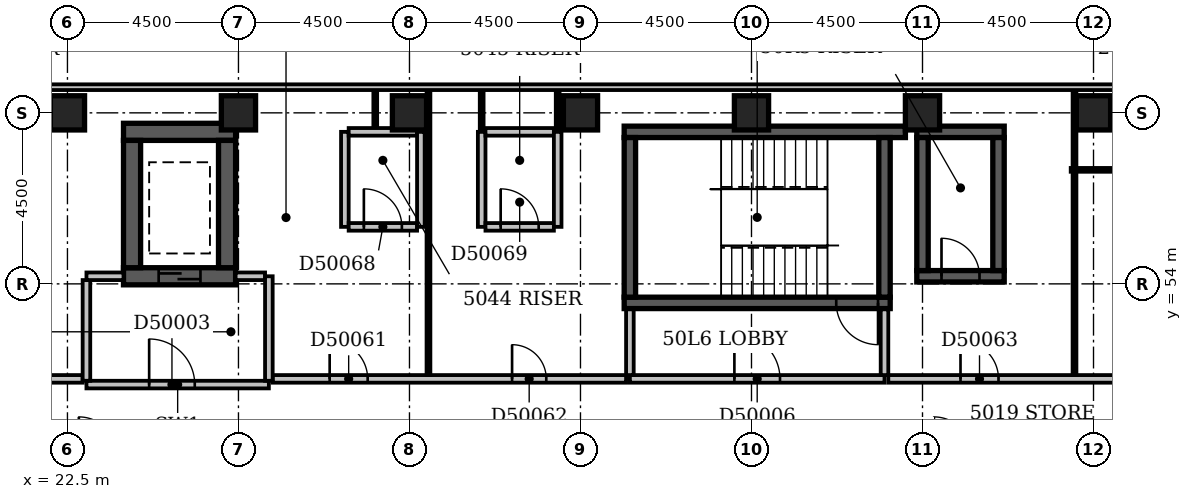
"""IFC4 building model, lengths in metres.
Left out: names, types, materials, properties, quantities, classifications, styles, units other than length and angle.
Written with IfcOpenShell. Run it as: python <this file> out.ifc"""

import sys

from ifc_helpers import new_model, si_unit, direction, frame, frame_2d, origin, origin_2d, place, context, subcontext, project, spatial, rectangle, extrude, element, fill, save


model = new_model("IFC4")
c1 = context("Model", 3, precision=1e-05, world=origin(), true_north=direction((0.0, 1.0)))
c2 = subcontext(c1, "Body", "Model", "MODEL_VIEW")
j1 = project(units=[si_unit("LENGTHUNIT", "METRE"), si_unit("PLANEANGLEUNIT", "RADIAN")], contexts=[c1])
p1 = place(None, origin())
s1 = spatial("IfcSite", under=j1, at=p1, CompositionType="ELEMENT")
p2 = place(p1, origin())
s2 = spatial("IfcBuilding", under=s1, at=p2, CompositionType="ELEMENT")
p3 = place(p2, frame((0.0, 0.0, 197.0)))
s3 = spatial("IfcBuildingStorey", under=s2, at=p3, CompositionType="ELEMENT", Elevation=197.0)
p4 = place(p3, frame((23.975, 54.2, -0.3), z_axis=(0.0, 0.0, 1.0), x_axis=(1.0, 0.0, 0.0)))
e1 = element("IfcWall", 1, at=p4, inside=s3, PredefinedType="SHEAR", context=c2, shape_type="SweptSolid", body=[
    extrude(rectangle(XDim=2.95, YDim=0.45, at=frame_2d((1.475, 0.0))), origin(), (0.0, 0.0, 1.0), 3.6),
])
p5 = place(p4, frame((0.925, 0.0, 0.3)))
e2 = element("IfcOpeningElement", 2, at=p5, cuts=e1, PredefinedType="OPENING", context=c2, shape_type="SweptSolid", body=[
    extrude(rectangle(XDim=1.1, YDim=2.1, at=frame_2d((0.55, 1.05))), frame((0.0, 0.237, 0.0), z_axis=(0.0, -1.0, 0.0), x_axis=(1.0, 0.0, 0.0)), (0.0, 0.0, 1.0), 0.474),
])
p6 = place(p3, frame((23.975, 58.0, -0.3), z_axis=(0.0, 0.0, 1.0), x_axis=(1.0, 0.0, 0.0)))
e3 = element("IfcWall", 3, at=p6, inside=s3, PredefinedType="SHEAR", context=c2, shape_type="SweptSolid", body=[
    extrude(rectangle(XDim=2.95, YDim=0.45, at=frame_2d((1.475, 0.0))), origin(), (0.0, 0.0, 1.0), 3.6),
])
for number, where, z_axis, x_axis in (
    (4, (24.2, 54.425, -0.3), (0.0, 0.0, 1.0), (0.0, 1.0, 0.0)),
    (5, (26.7, 54.425, -0.3), (0.0, 0.0, 1.0), (0.0, 1.0, 0.0)),
):
    element("IfcWall", number, at=place(p3, frame(where, z_axis=z_axis, x_axis=x_axis)), inside=s3, PredefinedType="SHEAR", context=c2, shape_type="SweptSolid", body=[
        extrude(rectangle(XDim=3.35, YDim=0.45, at=frame_2d((1.675, 0.0))), origin(), (0.0, 0.0, 1.0), 3.6),
    ])
p7 = place(p3, frame((37.15, 53.5, -0.3), z_axis=(0.0, 0.0, 1.0), x_axis=(1.0, 0.0, 0.0)))
e6 = element("IfcWall", 6, at=p7, inside=s3, PredefinedType="SHEAR", context=c2, shape_type="SweptSolid", body=[
    extrude(rectangle(XDim=7.0, YDim=0.3, at=frame_2d((3.5, 0.0))), origin(), (0.0, 0.0, 1.0), 3.6),
])
p8 = place(p7, frame((5.58, 0.0, 0.3)))
e7 = element("IfcOpeningElement", 7, at=p8, cuts=e6, PredefinedType="OPENING", context=c2, shape_type="SweptSolid", body=[
    extrude(rectangle(XDim=1.1, YDim=2.1, at=frame_2d((0.55, 1.05))), frame((0.0, 0.162, 0.0), z_axis=(0.0, -1.0, 0.0), x_axis=(1.0, 0.0, 0.0)), (0.0, 0.0, 1.0), 0.324),
])
p9 = place(p3, frame((37.15, 58.0, -0.3), z_axis=(0.0, 0.0, 1.0), x_axis=(1.0, 0.0, 0.0)))
e8 = element("IfcWall", 8, at=p9, inside=s3, PredefinedType="SHEAR", context=c2, shape_type="SweptSolid", body=[
    extrude(rectangle(XDim=7.4, YDim=0.3, at=frame_2d((3.7, 0.0))), origin(), (0.0, 0.0, 1.0), 3.6),
])
for number, where, z_axis, x_axis in (
    (9, (37.3, 53.65, -0.3), (0.0, 0.0, 1.0), (0.0, 1.0, 0.0)),
    (10, (44.0, 53.65, -0.3), (0.0, 0.0, 1.0), (0.0, 1.0, 0.0)),
):
    element("IfcWall", number, at=place(p3, frame(where, z_axis=z_axis, x_axis=x_axis)), inside=s3, PredefinedType="SHEAR", context=c2, shape_type="SweptSolid", body=[
        extrude(rectangle(XDim=4.2, YDim=0.3, at=frame_2d((2.1, 0.0))), origin(), (0.0, 0.0, 1.0), 3.6),
    ])
p10 = place(p3, frame((44.85, 54.2, -0.3), z_axis=(0.0, 0.0, 1.0), x_axis=(1.0, 0.0, 0.0)))
e11 = element("IfcWall", 11, at=p10, inside=s3, PredefinedType="SHEAR", context=c2, shape_type="SweptSolid", body=[
    extrude(rectangle(XDim=2.3, YDim=0.3, at=frame_2d((1.15, 0.0))), origin(), (0.0, 0.0, 1.0), 3.6),
])
p11 = place(p10, frame((0.65, 0.0, 0.3)))
e12 = element("IfcOpeningElement", 12, at=p11, cuts=e11, PredefinedType="OPENING", context=c2, shape_type="SweptSolid", body=[
    extrude(rectangle(XDim=1.0, YDim=2.1, at=frame_2d((0.5, 1.05))), frame((0.0, 0.162, 0.0), z_axis=(0.0, -1.0, 0.0), x_axis=(1.0, 0.0, 0.0)), (0.0, 0.0, 1.0), 0.324),
])
p12 = place(p3, frame((44.85, 58.0, -0.3), z_axis=(0.0, 0.0, 1.0), x_axis=(1.0, 0.0, 0.0)))
e13 = element("IfcWall", 13, at=p12, inside=s3, PredefinedType="SHEAR", context=c2, shape_type="SweptSolid", body=[
    extrude(rectangle(XDim=2.3, YDim=0.3, at=frame_2d((1.15, 0.0))), origin(), (0.0, 0.0, 1.0), 3.6),
])
for number, where, z_axis, x_axis in (
    (14, (45.0, 54.35, -0.3), (0.0, 0.0, 1.0), (0.0, 1.0, 0.0)),
    (15, (47.0, 54.35, -0.3), (0.0, 0.0, 1.0), (0.0, 1.0, 0.0)),
):
    element("IfcWall", number, at=place(p3, frame(where, z_axis=z_axis, x_axis=x_axis)), inside=s3, PredefinedType="SHEAR", context=c2, shape_type="SweptSolid", body=[
        extrude(rectangle(XDim=3.5, YDim=0.3, at=frame_2d((1.75, 0.0))), origin(), (0.0, 0.0, 1.0), 3.6),
    ])
for number, where, z_axis, x_axis in (
    (16, (22.5, 58.5, -0.3), (0.0, 0.0, 1.0), (1.0, 0.0, 0.0)),
    (17, (27.0, 58.5, -0.3), (0.0, 0.0, 1.0), (1.0, 0.0, 0.0)),
    (18, (31.5, 58.5, -0.3), (0.0, 0.0, 1.0), (1.0, 0.0, 0.0)),
    (19, (36.0, 58.5, -0.3), (0.0, 0.0, 1.0), (1.0, 0.0, 0.0)),
    (20, (40.5, 58.5, -0.3), (0.0, 0.0, 1.0), (1.0, 0.0, 0.0)),
    (21, (45.0, 58.5, -0.3), (0.0, 0.0, 1.0), (1.0, 0.0, 0.0)),
    (22, (49.5, 58.5, -0.3), (0.0, 0.0, 1.0), (1.0, 0.0, 0.0)),
):
    element("IfcColumn", number, at=place(p3, frame(where, z_axis=z_axis, x_axis=x_axis)), inside=s3, PredefinedType="COLUMN", context=c2, shape_type="SweptSolid", body=[
        extrude(rectangle(XDim=0.9, YDim=0.9, at=origin_2d()), origin(), (0.0, 0.0, 1.0), 3.6),
    ])
p13 = place(p3, frame((50.1, 59.175, 0.0), z_axis=(0.0, 0.0, 1.0), x_axis=(-1.0, 0.0, 0.0)))
e23 = element("IfcWall", 23, at=p13, inside=s3, PredefinedType="STANDARD", context=c2, shape_type="SweptSolid", body=[
    extrude(rectangle(XDim=50.85, YDim=0.15, at=frame_2d((25.425, 0.0))), origin(), (0.0, 0.0, 1.0), 2.7),
])
p14 = place(p3, frame((23.0, 51.35, 0.0), z_axis=(0.0, 0.0, 1.0), x_axis=(1.0, 0.0, 0.0)))
e24 = element("IfcWall", 24, at=p14, inside=s3, PredefinedType="PARTITIONING", context=c2, shape_type="SweptSolid", body=[
    extrude(rectangle(XDim=4.8, YDim=0.2, at=frame_2d((2.4, 0.0))), origin(), (0.0, 0.0, 1.0), 3.3),
])
p15 = place(p14, frame((1.65, 0.0, 0.0)))
e25 = element("IfcOpeningElement", 25, at=p15, cuts=e24, PredefinedType="OPENING", context=c2, shape_type="SweptSolid", body=[
    extrude(rectangle(XDim=1.2, YDim=2.1, at=frame_2d((0.6, 1.05))), frame((0.0, 0.112, 0.0), z_axis=(0.0, -1.0, 0.0), x_axis=(1.0, 0.0, 0.0)), (0.0, 0.0, 1.0), 0.224),
])
p16 = place(p3, frame((27.8, 51.45, 0.0), z_axis=(0.0, 0.0, 1.0), x_axis=(0.0, 1.0, 0.0)))
e26 = element("IfcWall", 26, at=p16, inside=s3, PredefinedType="PARTITIONING", context=c2, shape_type="SweptSolid", body=[
    extrude(rectangle(XDim=2.75, YDim=0.2, at=frame_2d((1.375, 0.0))), origin(), (0.0, 0.0, 1.0), 3.3),
])
p17 = place(p3, frame((23.0, 54.2, 0.0), z_axis=(0.0, 0.0, 1.0), x_axis=(1.0, 0.0, 0.0)))
e27 = element("IfcWall", 27, at=p17, inside=s3, PredefinedType="PARTITIONING", context=c2, shape_type="SweptSolid", body=[
    extrude(rectangle(XDim=0.975, YDim=0.2, at=frame_2d((0.488, 0.0))), origin(), (0.0, 0.0, 1.0), 3.3),
])
p18 = place(p3, frame((26.925, 54.2, 0.0), z_axis=(0.0, 0.0, 1.0), x_axis=(1.0, 0.0, 0.0)))
e28 = element("IfcWall", 28, at=p18, inside=s3, PredefinedType="PARTITIONING", context=c2, shape_type="SweptSolid", body=[
    extrude(rectangle(XDim=0.775, YDim=0.2, at=frame_2d((0.387, 0.0))), origin(), (0.0, 0.0, 1.0), 3.3),
])
p19 = place(p3, frame((23.0, 51.45, 0.0), z_axis=(0.0, 0.0, 1.0), x_axis=(0.0, 1.0, 0.0)))
e29 = element("IfcWall", 29, at=p19, inside=s3, PredefinedType="PARTITIONING", context=c2, shape_type="SweptSolid", body=[
    extrude(rectangle(XDim=2.65, YDim=0.2, at=frame_2d((1.325, 0.0))), origin(), (0.0, 0.0, 1.0), 3.3),
])
p20 = place(p3, frame((37.3, 51.5, 0.0), z_axis=(0.0, 0.0, 1.0), x_axis=(1.0, 0.0, 0.0)))
e30 = element("IfcWall", 30, at=p20, inside=s3, PredefinedType="PARTITIONING", context=c2, shape_type="SweptSolid", body=[
    extrude(rectangle(XDim=6.7, YDim=0.2, at=frame_2d((3.35, 0.0))), origin(), (0.0, 0.0, 1.0), 3.3),
])
p21 = place(p20, frame((2.75, 0.0, 0.0)))
e31 = element("IfcOpeningElement", 31, at=p21, cuts=e30, PredefinedType="OPENING", context=c2, shape_type="SweptSolid", body=[
    extrude(rectangle(XDim=1.2, YDim=2.1, at=frame_2d((0.6, 1.05))), frame((0.0, 0.112, 0.0), z_axis=(0.0, -1.0, 0.0), x_axis=(1.0, 0.0, 0.0)), (0.0, 0.0, 1.0), 0.224),
])
for number, where, z_axis, x_axis in (
    (32, (44.0, 51.6, 0.0), (0.0, 0.0, 1.0), (0.0, 1.0, 0.0)),
    (33, (37.3, 51.6, 0.0), (0.0, 0.0, 1.0), (0.0, 1.0, 0.0)),
):
    element("IfcWall", number, at=place(p3, frame(where, z_axis=z_axis, x_axis=x_axis)), inside=s3, PredefinedType="PARTITIONING", context=c2, shape_type="SweptSolid", body=[
        extrude(rectangle(XDim=1.73, YDim=0.2, at=frame_2d((0.865, 0.0))), origin(), (0.0, 0.0, 1.0), 3.3),
    ])
p22 = place(p3, frame((7.6, 51.5, 0.0), z_axis=(0.0, 0.0, 1.0), x_axis=(1.0, 0.0, 0.0)))
e34 = element("IfcWall", 34, at=p22, inside=s3, PredefinedType="PARTITIONING", context=c2, shape_type="SweptSolid", body=[
    extrude(rectangle(XDim=15.3, YDim=0.2, at=frame_2d((7.65, 0.0))), origin(), (0.0, 0.0, 1.0), 3.3),
])
p23 = place(p22, frame((3.55, 0.0, 0.0)))
e35 = element("IfcOpeningElement", 35, at=p23, cuts=e34, PredefinedType="OPENING", context=c2, shape_type="SweptSolid", body=[
    extrude(rectangle(XDim=0.9, YDim=2.1, at=frame_2d((0.45, 1.05))), frame((0.0, 0.112, 0.0), z_axis=(0.0, -1.0, 0.0), x_axis=(1.0, 0.0, 0.0)), (0.0, 0.0, 1.0), 0.224),
])
p24 = place(p22, frame((11.3, 0.0, 0.0)))
e36 = element("IfcOpeningElement", 36, at=p24, cuts=e34, PredefinedType="OPENING", context=c2, shape_type="SweptSolid", body=[
    extrude(rectangle(XDim=0.9, YDim=2.1, at=frame_2d((0.45, 1.05))), frame((0.0, 0.112, 0.0), z_axis=(0.0, -1.0, 0.0), x_axis=(1.0, 0.0, 0.0)), (0.0, 0.0, 1.0), 0.224),
])
p25 = place(p3, frame((27.9, 51.5, 0.0), z_axis=(0.0, 0.0, 1.0), x_axis=(1.0, 0.0, 0.0)))
e37 = element("IfcWall", 37, at=p25, inside=s3, PredefinedType="PARTITIONING", context=c2, shape_type="SweptSolid", body=[
    extrude(rectangle(XDim=9.3, YDim=0.2, at=frame_2d((4.65, 0.0))), origin(), (0.0, 0.0, 1.0), 3.3),
])
p26 = place(p25, frame((1.5, 0.0, 0.0)))
e38 = element("IfcOpeningElement", 38, at=p26, cuts=e37, PredefinedType="OPENING", context=c2, shape_type="SweptSolid", body=[
    extrude(rectangle(XDim=1.0, YDim=2.1, at=frame_2d((0.5, 1.05))), frame((0.0, 0.112, 0.0), z_axis=(0.0, -1.0, 0.0), x_axis=(1.0, 0.0, 0.0)), (0.0, 0.0, 1.0), 0.224),
])
p27 = place(p25, frame((6.3, 0.0, 0.0)))
e39 = element("IfcOpeningElement", 39, at=p27, cuts=e37, PredefinedType="OPENING", context=c2, shape_type="SweptSolid", body=[
    extrude(rectangle(XDim=0.9, YDim=2.1, at=frame_2d((0.45, 1.05))), frame((0.0, 0.112, 0.0), z_axis=(0.0, -1.0, 0.0), x_axis=(1.0, 0.0, 0.0)), (0.0, 0.0, 1.0), 0.224),
])
p28 = place(p3, frame((44.1, 51.5, 0.0), z_axis=(0.0, 0.0, 1.0), x_axis=(1.0, 0.0, 0.0)))
e40 = element("IfcWall", 40, at=p28, inside=s3, PredefinedType="PARTITIONING", context=c2, shape_type="SweptSolid", body=[
    extrude(rectangle(XDim=10.5, YDim=0.2, at=frame_2d((5.25, 0.0))), origin(), (0.0, 0.0, 1.0), 3.3),
])
p29 = place(p28, frame((1.9, 0.0, 0.0)))
e41 = element("IfcOpeningElement", 41, at=p29, cuts=e40, PredefinedType="OPENING", context=c2, shape_type="SweptSolid", body=[
    extrude(rectangle(XDim=1.0, YDim=2.1, at=frame_2d((0.5, 1.05))), frame((0.0, 0.112, 0.0), z_axis=(0.0, -1.0, 0.0), x_axis=(1.0, 0.0, 0.0)), (0.0, 0.0, 1.0), 0.224),
])
p30 = place(p28, frame((6.9, 0.0, 0.0)))
e42 = element("IfcOpeningElement", 42, at=p30, cuts=e40, PredefinedType="OPENING", context=c2, shape_type="SweptSolid", body=[
    extrude(rectangle(XDim=1.0, YDim=2.1, at=frame_2d((0.5, 1.05))), frame((0.0, 0.112, 0.0), z_axis=(0.0, -1.0, 0.0), x_axis=(1.0, 0.0, 0.0)), (0.0, 0.0, 1.0), 0.224),
])
for number, where, z_axis, x_axis in (
    (43, (32.0, 51.6, 0.0), (0.0, 0.0, 1.0), (0.0, 1.0, 0.0)),
    (44, (49.0, 51.6, 0.0), (0.0, 0.0, 1.0), (0.0, 1.0, 0.0)),
):
    element("IfcWall", number, at=place(p3, frame(where, z_axis=z_axis, x_axis=x_axis)), inside=s3, PredefinedType="PARTITIONING", context=c2, shape_type="SweptSolid", body=[
        extrude(rectangle(XDim=7.5, YDim=0.1, at=frame_2d((3.75, 0.0))), origin(), (0.0, 0.0, 1.0), 3.3),
    ])
p31 = place(p3, frame((29.8, 55.5, 0.0), z_axis=(0.0, 0.0, 1.0), x_axis=(0.0, 1.0, 0.0)))
e45 = element("IfcWall", 45, at=p31, inside=s3, PredefinedType="PARTITIONING", context=c2, shape_type="SweptSolid", body=[
    extrude(rectangle(XDim=2.5, YDim=0.2, at=frame_2d((1.25, 0.0))), origin(), (0.0, 0.0, 1.0), 3.3),
])
p32 = place(p3, frame((29.9, 55.5, 0.0), z_axis=(0.0, 0.0, 1.0), x_axis=(1.0, 0.0, 0.0)))
e46 = element("IfcWall", 46, at=p32, inside=s3, PredefinedType="PARTITIONING", context=c2, shape_type="SweptSolid", body=[
    extrude(rectangle(XDim=1.8, YDim=0.2, at=frame_2d((0.9, 0.0))), origin(), (0.0, 0.0, 1.0), 3.3),
])
p33 = place(p32, frame((0.4, 0.0, 0.0)))
e47 = element("IfcOpeningElement", 47, at=p33, cuts=e46, PredefinedType="OPENING", context=c2, shape_type="SweptSolid", body=[
    extrude(rectangle(XDim=1.0, YDim=2.1, at=frame_2d((0.5, 1.05))), frame((0.0, 0.112, 0.0), z_axis=(0.0, -1.0, 0.0), x_axis=(1.0, 0.0, 0.0)), (0.0, 0.0, 1.0), 0.224),
])
for number, where, z_axis, x_axis in (
    (48, (31.8, 55.5, 0.0), (0.0, 0.0, 1.0), (0.0, 1.0, 0.0)),
    (49, (33.4, 55.5, 0.0), (0.0, 0.0, 1.0), (0.0, 1.0, 0.0)),
):
    element("IfcWall", number, at=place(p3, frame(where, z_axis=z_axis, x_axis=x_axis)), inside=s3, PredefinedType="PARTITIONING", context=c2, shape_type="SweptSolid", body=[
        extrude(rectangle(XDim=2.5, YDim=0.2, at=frame_2d((1.25, 0.0))), origin(), (0.0, 0.0, 1.0), 3.3),
    ])
p34 = place(p3, frame((33.5, 55.5, 0.0), z_axis=(0.0, 0.0, 1.0), x_axis=(1.0, 0.0, 0.0)))
e50 = element("IfcWall", 50, at=p34, inside=s3, PredefinedType="PARTITIONING", context=c2, shape_type="SweptSolid", body=[
    extrude(rectangle(XDim=1.8, YDim=0.2, at=frame_2d((0.9, 0.0))), origin(), (0.0, 0.0, 1.0), 3.3),
])
p35 = place(p34, frame((0.4, 0.0, 0.0)))
e51 = element("IfcOpeningElement", 51, at=p35, cuts=e50, PredefinedType="OPENING", context=c2, shape_type="SweptSolid", body=[
    extrude(rectangle(XDim=1.0, YDim=2.1, at=frame_2d((0.5, 1.05))), frame((0.0, 0.112, 0.0), z_axis=(0.0, -1.0, 0.0), x_axis=(1.0, 0.0, 0.0)), (0.0, 0.0, 1.0), 0.224),
])
p36 = place(p3, frame((35.4, 55.5, 0.0), z_axis=(0.0, 0.0, 1.0), x_axis=(0.0, 1.0, 0.0)))
e52 = element("IfcWall", 52, at=p36, inside=s3, PredefinedType="PARTITIONING", context=c2, shape_type="SweptSolid", body=[
    extrude(rectangle(XDim=2.5, YDim=0.2, at=frame_2d((1.25, 0.0))), origin(), (0.0, 0.0, 1.0), 2.4),
])
p37 = place(p3, frame((48.9, 57.0, 0.0), z_axis=(0.0, 0.0, 1.0), x_axis=(1.0, 0.0, 0.0)))
e53 = element("IfcWall", 53, at=p37, inside=s3, PredefinedType="PARTITIONING", context=c2, shape_type="SweptSolid", body=[
    extrude(rectangle(XDim=1.65, YDim=0.1, at=frame_2d((0.825, 0.0))), origin(), (0.0, 0.0, 1.0), 3.3),
])
p38 = place(p3, frame((29.9, 58.0, 0.0), z_axis=(0.0, 0.0, 1.0), x_axis=(1.0, 0.0, 0.0)))
e54 = element("IfcWall", 54, at=p38, inside=s3, PredefinedType="PARTITIONING", context=c2, shape_type="SweptSolid", body=[
    extrude(rectangle(XDim=1.8, YDim=0.2, at=frame_2d((0.9, 0.0))), origin(), (0.0, 0.0, 1.0), 3.3),
])
p39 = place(p3, frame((33.4, 58.0, 0.0), z_axis=(0.0, 0.0, 1.0), x_axis=(0.0, 1.0, 0.0)))
e55 = element("IfcWall", 55, at=p39, inside=s3, PredefinedType="PARTITIONING", context=c2, shape_type="SweptSolid", body=[
    extrude(rectangle(XDim=1.1, YDim=0.1, at=frame_2d((0.55, 0.0))), origin(), (0.0, 0.0, 1.0), 3.3),
])
p40 = place(p3, frame((33.5, 58.0, 0.0), z_axis=(0.0, 0.0, 1.0), x_axis=(1.0, 0.0, 0.0)))
e56 = element("IfcWall", 56, at=p40, inside=s3, PredefinedType="PARTITIONING", context=c2, shape_type="SweptSolid", body=[
    extrude(rectangle(XDim=1.8, YDim=0.2, at=frame_2d((0.9, 0.0))), origin(), (0.0, 0.0, 1.0), 3.3),
])
p41 = place(p3, frame((35.4, 58.0, 0.0), z_axis=(0.0, 0.0, 1.0), x_axis=(0.0, 1.0, 0.0)))
e57 = element("IfcWall", 57, at=p41, inside=s3, PredefinedType="PARTITIONING", context=c2, shape_type="SweptSolid", body=[
    extrude(rectangle(XDim=1.1, YDim=0.1, at=frame_2d((0.55, 0.0))), origin(), (0.0, 0.0, 1.0), 2.4),
])
p42 = place(p3, frame((30.6, 58.1, 0.0), z_axis=(0.0, 0.0, 1.0), x_axis=(0.0, 1.0, 0.0)))
e58 = element("IfcWall", 58, at=p42, inside=s3, PredefinedType="PARTITIONING", context=c2, shape_type="SweptSolid", body=[
    extrude(rectangle(XDim=1.0, YDim=0.1, at=frame_2d((0.5, 0.0))), origin(), (0.0, 0.0, 1.0), 3.3),
])
p43 = place(p15, origin())
e59 = element("IfcDoor", 59, at=p43, inside=s3, OperationType="SINGLE_SWING_LEFT", PredefinedType="DOOR", context=c2, shape_type="SweptSolid", body=[
    extrude(rectangle(XDim=1.2, YDim=2.1, at=frame_2d((0.6, 1.05))), frame((0.0, 0.025, 0.0), z_axis=(0.0, -1.0, 0.0), x_axis=(1.0, 0.0, 0.0)), (0.0, 0.0, 1.0), 0.05),
])
fill(e25, e59)
p44 = place(p5, origin())
e60 = element("IfcDoor", 60, at=p44, inside=s3, OperationType="SLIDING_TO_LEFT", PredefinedType="DOOR", context=c2, shape_type="SweptSolid", body=[
    extrude(rectangle(XDim=1.1, YDim=2.1, at=frame_2d((0.55, 1.05))), frame((0.0, 0.025, 0.0), z_axis=(0.0, -1.0, 0.0), x_axis=(1.0, 0.0, 0.0)), (0.0, 0.0, 1.0), 0.05),
])
fill(e2, e60)
p45 = place(p21, origin())
e61 = element("IfcDoor", 61, at=p45, inside=s3, OperationType="SINGLE_SWING_LEFT", PredefinedType="DOOR", context=c2, shape_type="SweptSolid", body=[
    extrude(rectangle(XDim=1.2, YDim=2.1, at=frame_2d((0.6, 1.05))), frame((0.0, 0.025, 0.0), z_axis=(0.0, -1.0, 0.0), x_axis=(1.0, 0.0, 0.0)), (0.0, 0.0, 1.0), 0.05),
])
fill(e31, e61)
p46 = place(p11, origin())
e62 = element("IfcDoor", 62, at=p46, inside=s3, OperationType="SINGLE_SWING_LEFT", PredefinedType="DOOR", context=c2, shape_type="SweptSolid", body=[
    extrude(rectangle(XDim=1.0, YDim=2.1, at=frame_2d((0.5, 1.05))), frame((0.0, 0.025, 0.0), z_axis=(0.0, -1.0, 0.0), x_axis=(1.0, 0.0, 0.0)), (0.0, 0.0, 1.0), 0.05),
])
fill(e12, e62)
p47 = place(p8, origin())
e63 = element("IfcDoor", 63, at=p47, inside=s3, OperationType="SINGLE_SWING_RIGHT", PredefinedType="DOOR", context=c2, shape_type="SweptSolid", body=[
    extrude(rectangle(XDim=1.1, YDim=2.1, at=frame_2d((0.55, 1.05))), frame((0.0, 0.025, 0.0), z_axis=(0.0, -1.0, 0.0), x_axis=(1.0, 0.0, 0.0)), (0.0, 0.0, 1.0), 0.05),
])
fill(e7, e63)
p48 = place(p26, origin())
e64 = element("IfcDoor", 64, at=p48, inside=s3, OperationType="SINGLE_SWING_LEFT", PredefinedType="DOOR", context=c2, shape_type="SweptSolid", body=[
    extrude(rectangle(XDim=1.0, YDim=2.1, at=frame_2d((0.5, 1.05))), frame((0.0, 0.025, 0.0), z_axis=(0.0, -1.0, 0.0), x_axis=(1.0, 0.0, 0.0)), (0.0, 0.0, 1.0), 0.05),
])
fill(e38, e64)
p49 = place(p27, origin())
e65 = element("IfcDoor", 65, at=p49, inside=s3, OperationType="SINGLE_SWING_LEFT", PredefinedType="DOOR", context=c2, shape_type="SweptSolid", body=[
    extrude(rectangle(XDim=0.9, YDim=2.1, at=frame_2d((0.45, 1.05))), frame((0.0, 0.025, 0.0), z_axis=(0.0, -1.0, 0.0), x_axis=(1.0, 0.0, 0.0)), (0.0, 0.0, 1.0), 0.05),
])
fill(e39, e65)
p50 = place(p29, origin())
e66 = element("IfcDoor", 66, at=p50, inside=s3, OperationType="SINGLE_SWING_LEFT", PredefinedType="DOOR", context=c2, shape_type="SweptSolid", body=[
    extrude(rectangle(XDim=1.0, YDim=2.1, at=frame_2d((0.5, 1.05))), frame((0.0, 0.025, 0.0), z_axis=(0.0, -1.0, 0.0), x_axis=(1.0, 0.0, 0.0)), (0.0, 0.0, 1.0), 0.05),
])
fill(e41, e66)
p51 = place(p33, origin())
e67 = element("IfcDoor", 67, at=p51, inside=s3, OperationType="SINGLE_SWING_LEFT", PredefinedType="DOOR", context=c2, shape_type="SweptSolid", body=[
    extrude(rectangle(XDim=1.0, YDim=2.1, at=frame_2d((0.5, 1.05))), frame((0.0, 0.025, 0.0), z_axis=(0.0, -1.0, 0.0), x_axis=(1.0, 0.0, 0.0)), (0.0, 0.0, 1.0), 0.05),
])
fill(e47, e67)
p52 = place(p35, origin())
e68 = element("IfcDoor", 68, at=p52, inside=s3, OperationType="SINGLE_SWING_LEFT", PredefinedType="DOOR", context=c2, shape_type="SweptSolid", body=[
    extrude(rectangle(XDim=1.0, YDim=2.1, at=frame_2d((0.5, 1.05))), frame((0.0, 0.025, 0.0), z_axis=(0.0, -1.0, 0.0), x_axis=(1.0, 0.0, 0.0)), (0.0, 0.0, 1.0), 0.05),
])
fill(e51, e68)
save(model, sys.argv[1])
